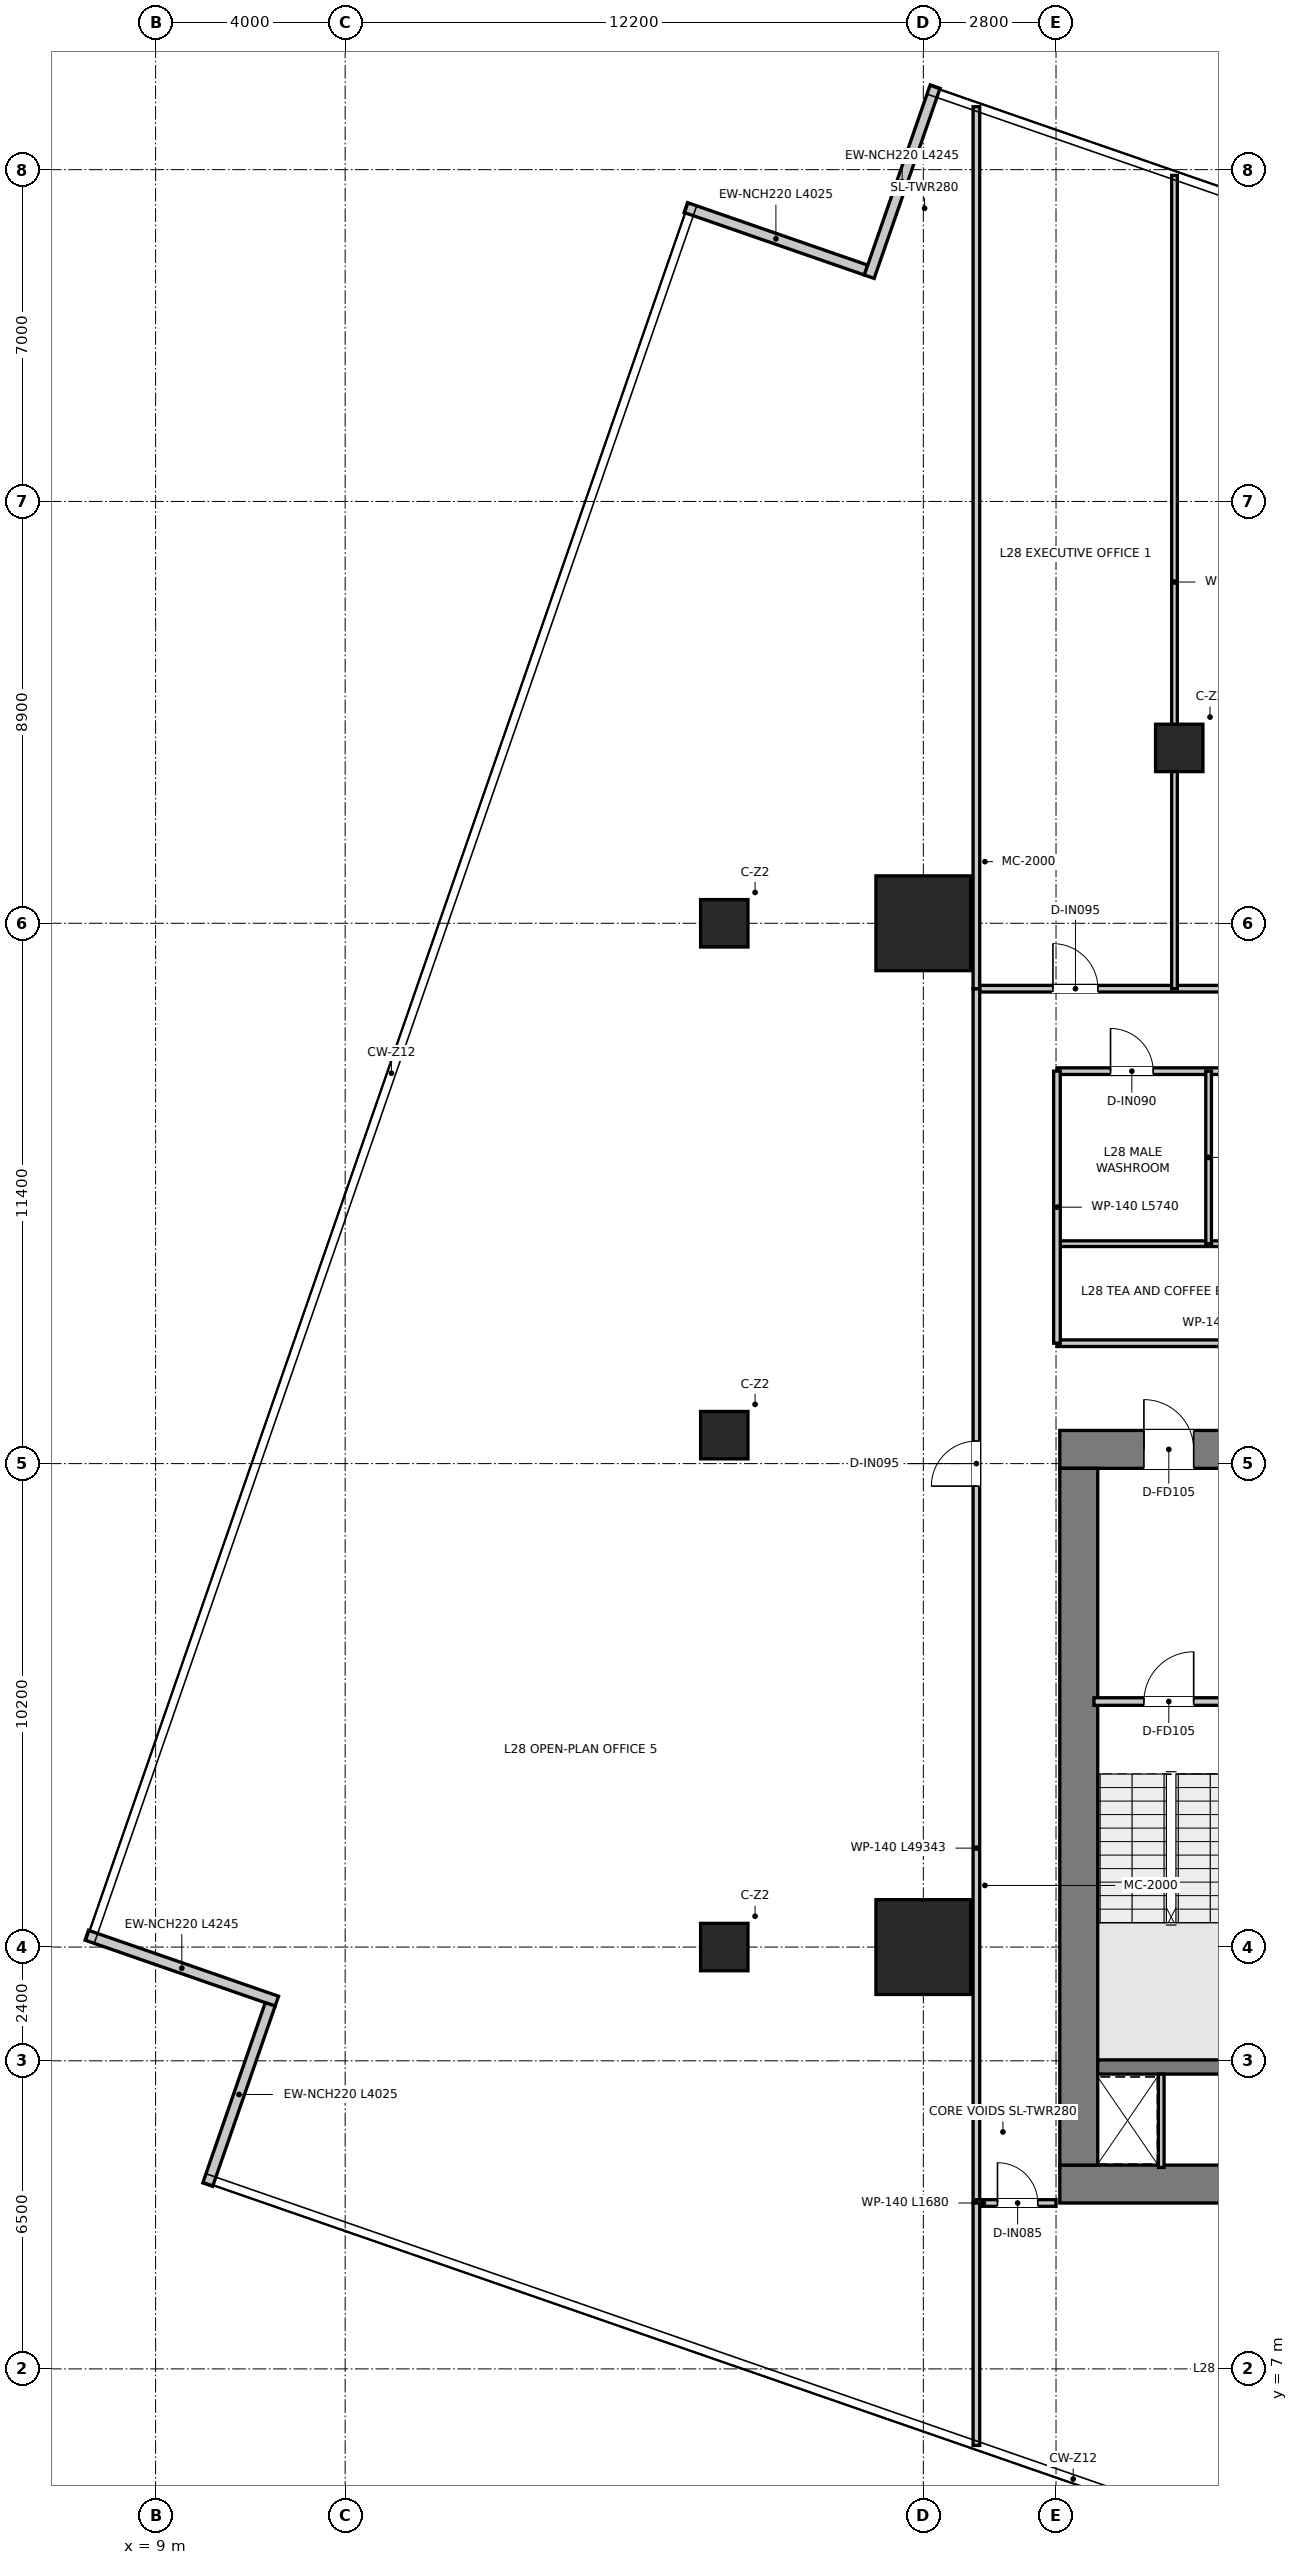
"""IFC4 building model, lengths in metres.
Left out: names, types, materials, properties, quantities, classifications, styles, units other than length and angle.
Written with IfcOpenShell. Run it as: python <this file> out.ifc"""

import sys

from ifc_helpers import new_model, si_unit, direction, frame, frame_2d, origin, origin_2d, place, context, subcontext, project, spatial, rectangle, extrude, source, transform, mapped, element, fill, save


model = new_model("IFC4")
c1 = context("Model", 3, precision=1e-05, world=origin(), true_north=direction((0.0, 1.0)))
c2 = subcontext(c1, "Body", "Model", "MODEL_VIEW")
j1 = project(units=[si_unit("LENGTHUNIT", "METRE"), si_unit("PLANEANGLEUNIT", "RADIAN")], contexts=[c1])
p1 = place(None, origin())
s1 = spatial("IfcSite", under=j1, at=p1, CompositionType="ELEMENT")
p2 = place(p1, origin())
s2 = spatial("IfcBuilding", under=s1, at=p2, CompositionType="ELEMENT")
p3 = place(p2, frame((0.0, 0.0, 117.7)))
s3 = spatial("IfcBuildingStorey", under=s2, at=p3, CompositionType="ELEMENT", Elevation=117.7)
p4 = place(p3, frame((28.08, 10.9, 0.0), z_axis=(0.0, 0.0, 1.0), x_axis=(1.0, 0.0, 0.0)))
e1 = element("IfcWall", 1, at=p4, inside=s3, PredefinedType="SHEAR", context=c2, shape_type="SweptSolid", body=[
    extrude(rectangle(XDim=15.84, YDim=0.8, at=frame_2d((7.92, 0.0))), origin(), (0.0, 0.0, 1.0), 3.95),
])
p5 = place(p3, frame((28.08, 26.4, 0.0), z_axis=(0.0, 0.0, 1.0), x_axis=(1.0, 0.0, 0.0)))
e2 = element("IfcWall", 2, at=p5, inside=s3, PredefinedType="SHEAR", context=c2, shape_type="SweptSolid", body=[
    extrude(rectangle(XDim=15.84, YDim=0.8, at=frame_2d((7.92, 0.0))), origin(), (0.0, 0.0, 1.0), 3.95),
])
p6 = place(p5, frame((7.22, 0.0, 0.0)))
e3 = element("IfcOpeningElement", 3, at=p6, cuts=e2, PredefinedType="OPENING", context=c2, shape_type="SweptSolid", body=[
    extrude(rectangle(XDim=1.4, YDim=2.2, at=frame_2d((0.7, 1.1))), frame((0.0, 0.41, 0.0), z_axis=(0.0, -1.0, 0.0), x_axis=(1.0, 0.0, 0.0)), (0.0, 0.0, 1.0), 0.82),
])
p7 = place(p5, frame((1.775, 0.0, 0.0)))
e4 = element("IfcOpeningElement", 4, at=p7, cuts=e2, PredefinedType="OPENING", context=c2, shape_type="SweptSolid", body=[
    extrude(rectangle(XDim=1.05, YDim=2.1, at=frame_2d((0.525, 1.05))), frame((0.0, 0.41, 0.0), z_axis=(0.0, -1.0, 0.0), x_axis=(1.0, 0.0, 0.0)), (0.0, 0.0, 1.0), 0.82),
])
p8 = place(p5, frame((13.015, 0.0, 0.0)))
e5 = element("IfcOpeningElement", 5, at=p8, cuts=e2, PredefinedType="OPENING", context=c2, shape_type="SweptSolid", body=[
    extrude(rectangle(XDim=1.05, YDim=2.1, at=frame_2d((0.525, 1.05))), frame((0.0, 0.41, 0.0), z_axis=(0.0, -1.0, 0.0), x_axis=(1.0, 0.0, 0.0)), (0.0, 0.0, 1.0), 0.82),
])
p9 = place(p3, frame((28.48, 11.3, 0.0), z_axis=(0.0, 0.0, 1.0), x_axis=(0.0, 1.0, 0.0)))
e6 = element("IfcWall", 6, at=p9, inside=s3, PredefinedType="SHEAR", context=c2, shape_type="SweptSolid", body=[
    extrude(rectangle(XDim=14.7, YDim=0.8, at=frame_2d((7.35, 0.0))), origin(), (0.0, 0.0, 1.0), 3.95),
])
p10 = place(p3, frame((28.88, 13.37, 0.0), z_axis=(0.0, 0.0, 1.0), x_axis=(1.0, 0.0, 0.0)))
e7 = element("IfcWall", 7, at=p10, inside=s3, PredefinedType="SHEAR", context=c2, shape_type="SweptSolid", body=[
    extrude(rectangle(XDim=3.1, YDim=0.3, at=frame_2d((1.55, 0.0))), origin(), (0.0, 0.0, 1.0), 3.95),
])
m1 = source(origin(), c2, "Body", "SweptSolid", [
    extrude(rectangle(XDim=2.0, YDim=2.0, at=origin_2d()), origin(), (0.0, 0.0, 1.0), 3.95),
])
for number, where, z_axis, x_axis in (
    (8, (25.2, 15.9, 0.0), (0.0, 0.0, 1.0), (1.0, 0.0, 0.0)),
    (9, (25.2, 37.5, 0.0), (0.0, 0.0, 1.0), (1.0, 0.0, 0.0)),
):
    element("IfcColumn", number, at=place(p3, frame(where, z_axis=z_axis, x_axis=x_axis)), inside=s3, PredefinedType="USERDEFINED", context=c2, shape_type="MappedRepresentation", body=[
        mapped(m1, transform((0.0, 0.0, 0.0), x_axis=(1.0, 0.0, 0.0), y_axis=(0.0, 1.0, 0.0), z_axis=(0.0, 0.0, 1.0), scale=1.0)),
    ])
m2 = source(origin(), c2, "Body", "SweptSolid", [
    extrude(rectangle(XDim=1.0, YDim=1.0, at=origin_2d()), origin(), (0.0, 0.0, 1.0), 3.95),
])
for number, where, z_axis, x_axis in (
    (10, (21.0, 15.9, 0.0), (0.0, 0.0, 1.0), (1.0, 0.0, 0.0)),
    (11, (21.0, 26.7, 0.0), (0.0, 0.0, 1.0), (1.0, 0.0, 0.0)),
    (12, (21.0, 37.5, 0.0), (0.0, 0.0, 1.0), (1.0, 0.0, 0.0)),
    (13, (30.6, 41.2, 0.0), (0.0, 0.0, 1.0), (1.0, 0.0, 0.0)),
):
    element("IfcColumn", number, at=place(p3, frame(where, z_axis=z_axis, x_axis=x_axis)), inside=s3, PredefinedType="COLUMN", context=c2, shape_type="MappedRepresentation", body=[
        mapped(m2, transform((0.0, 0.0, 0.0), x_axis=(1.0, 0.0, 0.0), y_axis=(0.0, 1.0, 0.0), z_axis=(0.0, 0.0, 1.0), scale=1.0)),
    ])
p11 = place(p3, frame((23.991, 51.281, 0.0), z_axis=(0.0, 0.0, 1.0), x_axis=(-0.944792639593, 0.327668839181, 0.0)))
e14 = element("IfcWall", 14, at=p11, inside=s3, PredefinedType="ELEMENTEDWALL", context=c2, shape_type="SweptSolid", body=[
    extrude(rectangle(XDim=4.025, YDim=0.22, at=frame_2d((2.012, 0.0))), origin(), (0.0, 0.0, 1.0), 3.67),
])
p12 = place(p3, frame((7.548, 16.149, 0.0), z_axis=(0.0, 0.0, 1.0), x_axis=(0.944801308279, -0.327643843028, 0.0)))
e15 = element("IfcWall", 15, at=p12, inside=s3, PredefinedType="ELEMENTEDWALL", context=c2, shape_type="SweptSolid", body=[
    extrude(rectangle(XDim=4.245, YDim=0.22, at=frame_2d((2.123, 0.0))), origin(), (0.0, 0.0, 1.0), 3.67),
])
p13 = place(p3, frame((11.419, 14.691, 0.0), z_axis=(0.0, 0.0, 1.0), x_axis=(-0.327668839181, -0.944792639593, 0.0)))
e16 = element("IfcWall", 16, at=p13, inside=s3, PredefinedType="ELEMENTEDWALL", context=c2, shape_type="SweptSolid", body=[
    extrude(rectangle(XDim=4.025, YDim=0.22, at=frame_2d((2.012, 0.0))), origin(), (0.0, 0.0, 1.0), 3.67),
])
p14 = place(p3, frame((25.449, 55.152, 0.0), z_axis=(0.0, 0.0, 1.0), x_axis=(-0.327643843028, -0.944801308279, 0.0)))
e17 = element("IfcWall", 17, at=p14, inside=s3, PredefinedType="ELEMENTEDWALL", context=c2, shape_type="SweptSolid", body=[
    extrude(rectangle(XDim=4.245, YDim=0.22, at=frame_2d((2.123, 0.0))), origin(), (0.0, 0.0, 1.0), 3.67),
])
p15 = place(p3, frame((28.8, 21.08, 0.0), z_axis=(0.0, 0.0, 1.0), x_axis=(1.0, 0.0, 0.0)))
e18 = element("IfcWall", 18, at=p15, inside=s3, PredefinedType="PARTITIONING", context=c2, shape_type="SweptSolid", body=[
    extrude(rectangle(XDim=3.16, YDim=0.16, at=frame_2d((1.58, 0.0))), origin(), (0.0, 0.0, 1.0), 3.67),
])
p16 = place(p15, frame((1.055, 0.0, 0.0)))
e19 = element("IfcOpeningElement", 19, at=p16, cuts=e18, PredefinedType="OPENING", context=c2, shape_type="SweptSolid", body=[
    extrude(rectangle(XDim=1.05, YDim=2.1, at=frame_2d((0.525, 1.05))), frame((0.0, 0.09, 0.0), z_axis=(0.0, -1.0, 0.0), x_axis=(1.0, 0.0, 0.0)), (0.0, 0.0, 1.0), 0.18),
])
p17 = place(p3, frame((30.22, 11.25, 0.0), z_axis=(0.0, 0.0, 1.0), x_axis=(0.0, 1.0, 0.0)))
e20 = element("IfcWall", 20, at=p17, inside=s3, PredefinedType="PARTITIONING", context=c2, shape_type="SweptSolid", body=[
    extrude(rectangle(XDim=1.97, YDim=0.12, at=frame_2d((0.985, 0.0))), origin(), (0.0, 0.0, 1.0), 3.67),
])
p18 = place(p3, frame((28.02, 28.64, 0.0), z_axis=(0.0, 0.0, 1.0), x_axis=(1.0, 0.0, 0.0)))
e21 = element("IfcWall", 21, at=p18, inside=s3, PredefinedType="PARTITIONING", context=c2, shape_type="SweptSolid", body=[
    extrude(rectangle(XDim=15.96, YDim=0.14, at=frame_2d((7.98, 0.0))), origin(), (0.0, 0.0, 1.0), 3.08),
])
p19 = place(p18, frame((7.455, 0.0, 0.0)))
e22 = element("IfcOpeningElement", 22, at=p19, cuts=e21, PredefinedType="OPENING", context=c2, shape_type="SweptSolid", body=[
    extrude(rectangle(XDim=1.05, YDim=2.15, at=frame_2d((0.525, 1.075))), frame((0.0, 0.08, 0.0), z_axis=(0.0, -1.0, 0.0), x_axis=(1.0, 0.0, 0.0)), (0.0, 0.0, 1.0), 0.16),
])
p20 = place(p3, frame((28.02, 30.74, 0.0), z_axis=(0.0, 0.0, 1.0), x_axis=(1.0, 0.0, 0.0)))
e23 = element("IfcWall", 23, at=p20, inside=s3, PredefinedType="PARTITIONING", context=c2, shape_type="SweptSolid", body=[
    extrude(rectangle(XDim=15.96, YDim=0.12, at=frame_2d((7.98, 0.0))), origin(), (0.0, 0.0, 1.0), 3.08),
])
p21 = place(p3, frame((28.02, 34.38, 0.0), z_axis=(0.0, 0.0, 1.0), x_axis=(1.0, 0.0, 0.0)))
e24 = element("IfcWall", 24, at=p21, inside=s3, PredefinedType="PARTITIONING", context=c2, shape_type="SweptSolid", body=[
    extrude(rectangle(XDim=15.96, YDim=0.14, at=frame_2d((7.98, 0.0))), origin(), (0.0, 0.0, 1.0), 3.08),
])
p22 = place(p21, frame((1.13, 0.0, 0.0)))
e25 = element("IfcOpeningElement", 25, at=p22, cuts=e24, PredefinedType="OPENING", context=c2, shape_type="SweptSolid", body=[
    extrude(rectangle(XDim=0.9, YDim=2.1, at=frame_2d((0.45, 1.05))), frame((0.0, 0.08, 0.0), z_axis=(0.0, -1.0, 0.0), x_axis=(1.0, 0.0, 0.0)), (0.0, 0.0, 1.0), 0.16),
])
p23 = place(p21, frame((4.33, 0.0, 0.0)))
e26 = element("IfcOpeningElement", 26, at=p23, cuts=e24, PredefinedType="OPENING", context=c2, shape_type="SweptSolid", body=[
    extrude(rectangle(XDim=0.9, YDim=2.1, at=frame_2d((0.45, 1.05))), frame((0.0, 0.08, 0.0), z_axis=(0.0, -1.0, 0.0), x_axis=(1.0, 0.0, 0.0)), (0.0, 0.0, 1.0), 0.16),
])
p24 = place(p21, frame((7.355, 0.0, 0.0)))
e27 = element("IfcOpeningElement", 27, at=p24, cuts=e24, PredefinedType="OPENING", context=c2, shape_type="SweptSolid", body=[
    extrude(rectangle(XDim=0.95, YDim=2.1, at=frame_2d((0.475, 1.05))), frame((0.0, 0.08, 0.0), z_axis=(0.0, -1.0, 0.0), x_axis=(1.0, 0.0, 0.0)), (0.0, 0.0, 1.0), 0.16),
])
p25 = place(p21, frame((12.23, 0.0, 0.0)))
e28 = element("IfcOpeningElement", 28, at=p25, cuts=e24, PredefinedType="OPENING", context=c2, shape_type="SweptSolid", body=[
    extrude(rectangle(XDim=0.95, YDim=2.1, at=frame_2d((0.475, 1.05))), frame((0.0, 0.08, 0.0), z_axis=(0.0, -1.0, 0.0), x_axis=(1.0, 0.0, 0.0)), (0.0, 0.0, 1.0), 0.16),
])
p26 = place(p3, frame((28.02, 28.64, 0.0), z_axis=(0.0, 0.0, 1.0), x_axis=(0.0, 1.0, 0.0)))
e29 = element("IfcWall", 29, at=p26, inside=s3, PredefinedType="PARTITIONING", context=c2, shape_type="SweptSolid", body=[
    extrude(rectangle(XDim=5.74, YDim=0.14, at=frame_2d((2.87, 0.0))), origin(), (0.0, 0.0, 1.0), 3.27),
])
p27 = place(p3, frame((31.22, 30.74, 0.0), z_axis=(0.0, 0.0, 1.0), x_axis=(0.0, 1.0, 0.0)))
e30 = element("IfcWall", 30, at=p27, inside=s3, PredefinedType="PARTITIONING", context=c2, shape_type="SweptSolid", body=[
    extrude(rectangle(XDim=3.64, YDim=0.12, at=frame_2d((1.82, 0.0))), origin(), (0.0, 0.0, 1.0), 3.17),
])
p28 = place(p3, frame((26.32, 36.12, 0.0), z_axis=(0.0, 0.0, 1.0), x_axis=(1.0, 0.0, 0.0)))
e31 = element("IfcWall", 31, at=p28, inside=s3, PredefinedType="PARTITIONING", context=c2, shape_type="SweptSolid", body=[
    extrude(rectangle(XDim=19.36, YDim=0.14, at=frame_2d((9.68, 0.0))), origin(), (0.0, 0.0, 1.0), 3.08),
])
p29 = place(p28, frame((1.615, 0.0, 0.0)))
e32 = element("IfcOpeningElement", 32, at=p29, cuts=e31, PredefinedType="OPENING", context=c2, shape_type="SweptSolid", body=[
    extrude(rectangle(XDim=0.95, YDim=2.1, at=frame_2d((0.475, 1.05))), frame((0.0, 0.08, 0.0), z_axis=(0.0, -1.0, 0.0), x_axis=(1.0, 0.0, 0.0)), (0.0, 0.0, 1.0), 0.16),
])
p30 = place(p28, frame((6.705, 0.0, 0.0)))
e33 = element("IfcOpeningElement", 33, at=p30, cuts=e31, PredefinedType="OPENING", context=c2, shape_type="SweptSolid", body=[
    extrude(rectangle(XDim=0.95, YDim=2.1, at=frame_2d((0.475, 1.05))), frame((0.0, 0.08, 0.0), z_axis=(0.0, -1.0, 0.0), x_axis=(1.0, 0.0, 0.0)), (0.0, 0.0, 1.0), 0.16),
])
p31 = place(p28, frame((12.705, 0.0, 0.0)))
e34 = element("IfcOpeningElement", 34, at=p31, cuts=e31, PredefinedType="OPENING", context=c2, shape_type="SweptSolid", body=[
    extrude(rectangle(XDim=0.95, YDim=2.1, at=frame_2d((0.475, 1.05))), frame((0.0, 0.08, 0.0), z_axis=(0.0, -1.0, 0.0), x_axis=(1.0, 0.0, 0.0)), (0.0, 0.0, 1.0), 0.16),
])
p32 = place(p28, frame((17.295, 0.0, 0.0)))
e35 = element("IfcOpeningElement", 35, at=p32, cuts=e31, PredefinedType="OPENING", context=c2, shape_type="SweptSolid", body=[
    extrude(rectangle(XDim=0.95, YDim=2.1, at=frame_2d((0.475, 1.05))), frame((0.0, 0.08, 0.0), z_axis=(0.0, -1.0, 0.0), x_axis=(1.0, 0.0, 0.0)), (0.0, 0.0, 1.0), 0.16),
])
p33 = place(p3, frame((26.32, 10.5, 0.0), z_axis=(0.0, 0.0, 1.0), x_axis=(0.0, 1.0, 0.0)))
e36 = element("IfcWall", 36, at=p33, inside=s3, PredefinedType="PARTITIONING", context=c2, shape_type="SweptSolid", body=[
    extrude(rectangle(XDim=25.62, YDim=0.14, at=frame_2d((12.81, 0.0))), origin(), (0.0, 0.0, 1.0), 2.97),
])
p34 = place(p33, frame((15.125, 0.0, 0.0)))
e37 = element("IfcOpeningElement", 37, at=p34, cuts=e36, PredefinedType="OPENING", context=c2, shape_type="SweptSolid", body=[
    extrude(rectangle(XDim=0.95, YDim=2.1, at=frame_2d((0.475, 1.05))), frame((0.0, 0.08, 0.0), z_axis=(0.0, -1.0, 0.0), x_axis=(1.0, 0.0, 0.0)), (0.0, 0.0, 1.0), 0.16),
])
p35 = place(p3, frame((26.32, 10.5, 0.0), z_axis=(0.0, 0.0, 1.0), x_axis=(1.0, 0.0, 0.0)))
e38 = element("IfcWall", 38, at=p35, inside=s3, PredefinedType="PARTITIONING", context=c2, shape_type="SweptSolid", body=[
    extrude(rectangle(XDim=1.68, YDim=0.14, at=frame_2d((0.84, 0.0))), origin(), (0.0, 0.0, 1.0), 3.67),
])
p36 = place(p35, frame((0.445, 0.0, 0.0)))
e39 = element("IfcOpeningElement", 39, at=p36, cuts=e38, PredefinedType="OPENING", context=c2, shape_type="SweptSolid", body=[
    extrude(rectangle(XDim=0.85, YDim=2.1, at=frame_2d((0.425, 1.05))), frame((0.0, 0.08, 0.0), z_axis=(0.0, -1.0, 0.0), x_axis=(1.0, 0.0, 0.0)), (0.0, 0.0, 1.0), 0.16),
])
p37 = place(p3, frame((26.32, 36.12, 0.0), z_axis=(0.0, 0.0, 1.0), x_axis=(0.0, 1.0, 0.0)))
e40 = element("IfcWall", 40, at=p37, inside=s3, PredefinedType="PARTITIONING", context=c2, shape_type="SweptSolid", body=[
    extrude(rectangle(XDim=18.608, YDim=0.14, at=frame_2d((9.304, 0.0))), origin(), (0.0, 0.0, 1.0), 2.97),
])
p38 = place(p3, frame((26.32, 5.385, 0.0), z_axis=(0.0, 0.0, 1.0), x_axis=(0.0, 1.0, 0.0)))
e41 = element("IfcWall", 41, at=p38, inside=s3, PredefinedType="PARTITIONING", context=c2, shape_type="SweptSolid", body=[
    extrude(rectangle(XDim=5.115, YDim=0.14, at=frame_2d((2.558, 0.0))), origin(), (0.0, 0.0, 1.0), 3.67),
])
p39 = place(p3, frame((30.5, 36.12, 0.0), z_axis=(0.0, 0.0, 1.0), x_axis=(0.0, 1.0, 0.0)))
e42 = element("IfcWall", 42, at=p39, inside=s3, PredefinedType="PARTITIONING", context=c2, shape_type="SweptSolid", body=[
    extrude(rectangle(XDim=17.159, YDim=0.12, at=frame_2d((8.58, 0.0))), origin(), (0.0, 0.0, 1.0), 2.97),
])
p40 = place(p16, origin())
e43 = element("IfcDoor", 43, at=p40, inside=s3, OperationType="SINGLE_SWING_RIGHT", PredefinedType="DOOR", context=c2, shape_type="SweptSolid", body=[
    extrude(rectangle(XDim=1.05, YDim=2.1, at=frame_2d((0.525, 1.05))), frame((0.0, 0.025, 0.0), z_axis=(0.0, -1.0, 0.0), x_axis=(1.0, 0.0, 0.0)), (0.0, 0.0, 1.0), 0.05),
])
fill(e19, e43)
p41 = place(p7, origin())
e44 = element("IfcDoor", 44, at=p41, inside=s3, OperationType="SINGLE_SWING_LEFT", PredefinedType="DOOR", context=c2, shape_type="SweptSolid", body=[
    extrude(rectangle(XDim=1.05, YDim=2.1, at=frame_2d((0.525, 1.05))), frame((0.0, 0.025, 0.0), z_axis=(0.0, -1.0, 0.0), x_axis=(1.0, 0.0, 0.0)), (0.0, 0.0, 1.0), 0.05),
])
fill(e4, e44)
p42 = place(p22, origin())
e45 = element("IfcDoor", 45, at=p42, inside=s3, OperationType="SINGLE_SWING_LEFT", PredefinedType="DOOR", context=c2, shape_type="SweptSolid", body=[
    extrude(rectangle(XDim=0.9, YDim=2.1, at=frame_2d((0.45, 1.05))), frame((0.0, 0.025, 0.0), z_axis=(0.0, -1.0, 0.0), x_axis=(1.0, 0.0, 0.0)), (0.0, 0.0, 1.0), 0.05),
])
fill(e25, e45)
p43 = place(p29, origin())
e46 = element("IfcDoor", 46, at=p43, inside=s3, OperationType="SINGLE_SWING_LEFT", PredefinedType="DOOR", context=c2, shape_type="SweptSolid", body=[
    extrude(rectangle(XDim=0.95, YDim=2.1, at=frame_2d((0.475, 1.05))), frame((0.0, 0.025, 0.0), z_axis=(0.0, -1.0, 0.0), x_axis=(1.0, 0.0, 0.0)), (0.0, 0.0, 1.0), 0.05),
])
fill(e32, e46)
p44 = place(p34, origin())
e47 = element("IfcDoor", 47, at=p44, inside=s3, OperationType="SINGLE_SWING_LEFT", PredefinedType="DOOR", context=c2, shape_type="SweptSolid", body=[
    extrude(rectangle(XDim=0.95, YDim=2.1, at=frame_2d((0.475, 1.05))), frame((0.0, 0.025, 0.0), z_axis=(0.0, -1.0, 0.0), x_axis=(1.0, 0.0, 0.0)), (0.0, 0.0, 1.0), 0.05),
])
fill(e37, e47)
p45 = place(p36, origin())
e48 = element("IfcDoor", 48, at=p45, inside=s3, OperationType="SINGLE_SWING_LEFT", PredefinedType="DOOR", context=c2, shape_type="SweptSolid", body=[
    extrude(rectangle(XDim=0.85, YDim=2.1, at=frame_2d((0.425, 1.05))), frame((0.0, 0.025, 0.0), z_axis=(0.0, -1.0, 0.0), x_axis=(1.0, 0.0, 0.0)), (0.0, 0.0, 1.0), 0.05),
])
fill(e39, e48)
save(model, sys.argv[1])
